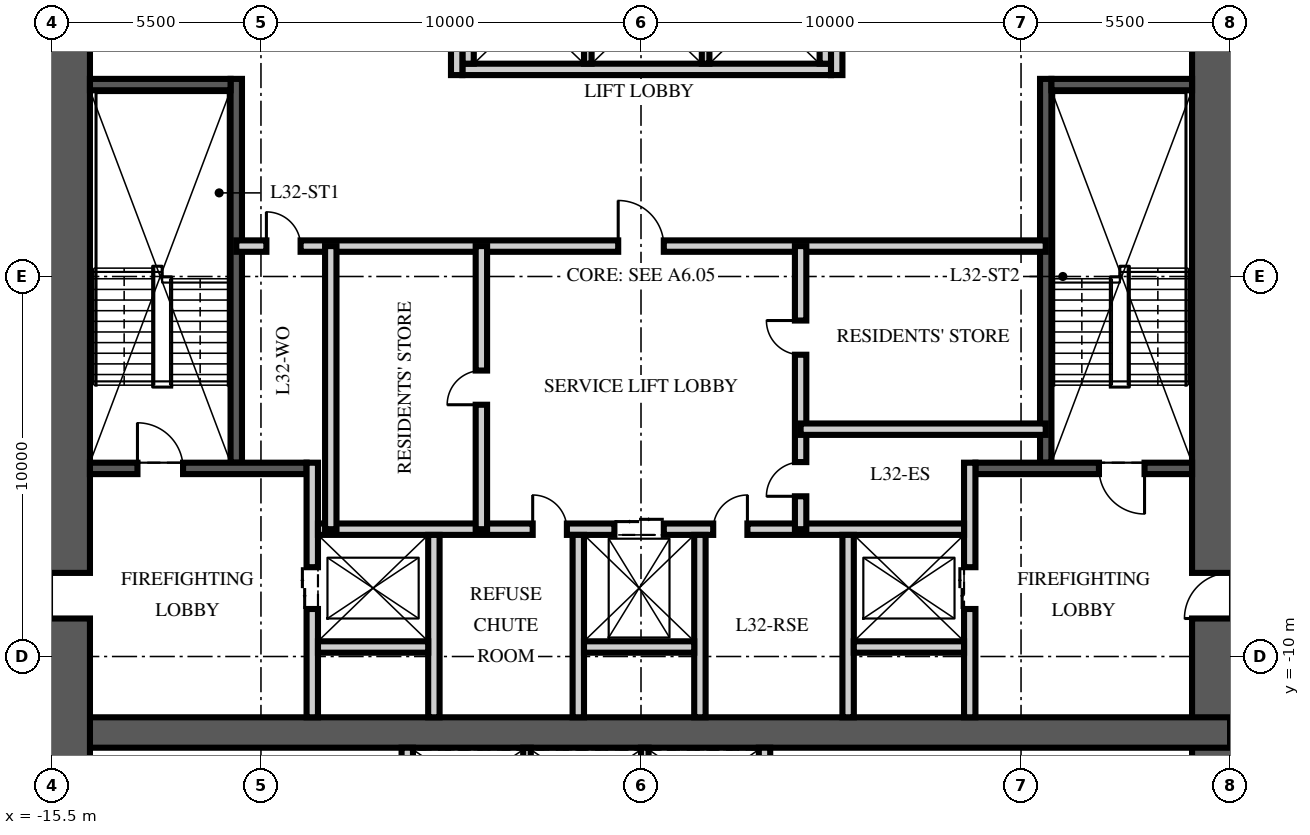
"""IFC4 building model, lengths in metres.
Left out: names, types, materials, properties, quantities, classifications, styles, units other than length and angle.
Written with IfcOpenShell. Run it as: python <this file> out.ifc"""

import sys

from ifc_helpers import new_model, si_unit, direction, frame, frame_2d, origin, place, context, subcontext, project, spatial, rectangle, extrude, element, fill, save


model = new_model("IFC4")
c1 = context("Model", 3, precision=1e-05, world=origin(), true_north=direction((0.0, 1.0)))
c2 = subcontext(c1, "Body", "Model", "MODEL_VIEW")
j1 = project(units=[si_unit("LENGTHUNIT", "METRE"), si_unit("PLANEANGLEUNIT", "RADIAN")], contexts=[c1])
p1 = place(None, origin())
s1 = spatial("IfcSite", under=j1, at=p1, CompositionType="ELEMENT")
p2 = place(p1, origin())
s2 = spatial("IfcBuilding", under=s1, at=p2, CompositionType="ELEMENT")
p3 = place(p2, frame((0.0, 0.0, 129.75)))
s3 = spatial("IfcBuildingStorey", under=s2, at=p3, CompositionType="ELEMENT", Elevation=129.75)
p4 = place(p3, frame((15.5, -15.5, -0.25), z_axis=(0.0, 0.0, 1.0), x_axis=(0.0, 1.0, 0.0)))
e1 = element("IfcWall", 1, at=p4, inside=s3, PredefinedType="SHEAR", context=c2, shape_type="SweptSolid", body=[
    extrude(rectangle(XDim=31.0, YDim=2.0, at=frame_2d((15.5, 0.0))), origin(), (0.0, 0.0, 1.0), 3.75),
])
p5 = place(p4, frame((6.5, 0.0, 0.25)))
e2 = element("IfcOpeningElement", 2, at=p5, cuts=e1, PredefinedType="OPENING", context=c2, shape_type="SweptSolid", body=[
    extrude(rectangle(XDim=1.2, YDim=2.1, at=frame_2d((0.6, 1.05))), frame((0.0, 1.01, 0.0), z_axis=(0.0, -1.0, 0.0), x_axis=(1.0, 0.0, 0.0)), (0.0, 0.0, 1.0), 2.02),
])
p6 = place(p4, frame((23.0, 0.0, 0.25)))
e3 = element("IfcOpeningElement", 3, at=p6, cuts=e1, PredefinedType="OPENING", context=c2, shape_type="SweptSolid", body=[
    extrude(rectangle(XDim=1.8, YDim=2.1, at=frame_2d((0.9, 1.05))), frame((0.0, 1.01, 0.0), z_axis=(0.0, -1.0, 0.0), x_axis=(1.0, 0.0, 0.0)), (0.0, 0.0, 1.0), 2.02),
])
p7 = place(p3, frame((-15.5, -12.0, -0.25), z_axis=(0.0, 0.0, 1.0), x_axis=(1.0, 0.0, 0.0)))
e4 = element("IfcWall", 4, at=p7, inside=s3, PredefinedType="SHEAR", context=c2, shape_type="SweptSolid", body=[
    extrude(rectangle(XDim=31.0, YDim=0.8, at=frame_2d((15.5, 0.0))), origin(), (0.0, 0.0, 1.0), 3.75),
])
p8 = place(p3, frame((-15.5, -15.5, -0.25), z_axis=(0.0, 0.0, 1.0), x_axis=(0.0, 1.0, 0.0)))
e5 = element("IfcWall", 5, at=p8, inside=s3, PredefinedType="SHEAR", context=c2, shape_type="SweptSolid", body=[
    extrude(rectangle(XDim=31.0, YDim=2.0, at=frame_2d((15.5, 0.0))), origin(), (0.0, 0.0, 1.0), 3.75),
])
p9 = place(p8, frame((6.5, 0.0, 0.25)))
e6 = element("IfcOpeningElement", 6, at=p9, cuts=e5, PredefinedType="OPENING", context=c2, shape_type="SweptSolid", body=[
    extrude(rectangle(XDim=1.2, YDim=2.1, at=frame_2d((0.6, 1.05))), frame((0.0, 1.01, 0.0), z_axis=(0.0, -1.0, 0.0), x_axis=(1.0, 0.0, 0.0)), (0.0, 0.0, 1.0), 2.02),
])
p10 = place(p8, frame((23.0, 0.0, 0.25)))
e7 = element("IfcOpeningElement", 7, at=p10, cuts=e5, PredefinedType="OPENING", context=c2, shape_type="SweptSolid", body=[
    extrude(rectangle(XDim=1.8, YDim=2.1, at=frame_2d((0.9, 1.05))), frame((0.0, 1.01, 0.0), z_axis=(0.0, -1.0, 0.0), x_axis=(1.0, 0.0, 0.0)), (0.0, 0.0, 1.0), 2.02),
])
p11 = place(p3, frame((-10.65, -4.9, 0.0), z_axis=(0.0, 0.0, 1.0), x_axis=(0.0, 1.0, 0.0)))
e8 = element("IfcWall", 8, at=p11, inside=s3, PredefinedType="SOLIDWALL", context=c2, shape_type="SweptSolid", body=[
    extrude(rectangle(XDim=10.1, YDim=0.3, at=frame_2d((5.05, 0.0))), origin(), (0.0, 0.0, 1.0), 3.5),
])
p12 = place(p3, frame((-14.5, -5.05, 0.0), z_axis=(0.0, 0.0, 1.0), x_axis=(1.0, 0.0, 0.0)))
e9 = element("IfcWall", 9, at=p12, inside=s3, PredefinedType="SOLIDWALL", context=c2, shape_type="SweptSolid", body=[
    extrude(rectangle(XDim=5.7, YDim=0.3, at=frame_2d((2.85, 0.0))), origin(), (0.0, 0.0, 1.0), 3.5),
])
p13 = place(p12, frame((1.25, 0.0, 0.0)))
e10 = element("IfcOpeningElement", 10, at=p13, cuts=e9, PredefinedType="OPENING", context=c2, shape_type="SweptSolid", body=[
    extrude(rectangle(XDim=1.2, YDim=2.1, at=frame_2d((0.6, 1.05))), frame((0.0, 0.16, 0.0), z_axis=(0.0, -1.0, 0.0), x_axis=(1.0, 0.0, 0.0)), (0.0, 0.0, 1.0), 0.32),
])
p14 = place(p3, frame((-14.5, 5.05, 0.0), z_axis=(0.0, 0.0, 1.0), x_axis=(1.0, 0.0, 0.0)))
e11 = element("IfcWall", 11, at=p14, inside=s3, PredefinedType="SOLIDWALL", context=c2, shape_type="SweptSolid", body=[
    extrude(rectangle(XDim=3.7, YDim=0.3, at=frame_2d((1.85, 0.0))), origin(), (0.0, 0.0, 1.0), 3.5),
])
p15 = place(p3, frame((-8.65, -11.6, 0.0), z_axis=(0.0, 0.0, 1.0), x_axis=(0.0, 1.0, 0.0)))
e12 = element("IfcWall", 12, at=p15, inside=s3, PredefinedType="PARTITIONING", context=c2, shape_type="SweptSolid", body=[
    extrude(rectangle(XDim=6.7, YDim=0.3, at=frame_2d((3.35, 0.0))), origin(), (0.0, 0.0, 1.0), 3.5),
])
p16 = place(p15, frame((2.85, 0.0, 0.0)))
e13 = element("IfcOpeningElement", 13, at=p16, cuts=e12, PredefinedType="OPENING", context=c2, shape_type="SweptSolid", body=[
    extrude(rectangle(XDim=1.1, YDim=2.1, at=frame_2d((0.55, 1.05))), frame((0.0, 0.16, 0.0), z_axis=(0.0, -1.0, 0.0), x_axis=(1.0, 0.0, 0.0)), (0.0, 0.0, 1.0), 0.32),
])
p17 = place(p3, frame((10.65, -4.9, 0.0), z_axis=(0.0, 0.0, 1.0), x_axis=(0.0, 1.0, 0.0)))
e14 = element("IfcWall", 14, at=p17, inside=s3, PredefinedType="SOLIDWALL", context=c2, shape_type="SweptSolid", body=[
    extrude(rectangle(XDim=10.1, YDim=0.3, at=frame_2d((5.05, 0.0))), origin(), (0.0, 0.0, 1.0), 3.5),
])
p18 = place(p3, frame((14.5, -5.05, 0.0), z_axis=(0.0, 0.0, 1.0), x_axis=(-1.0, 0.0, 0.0)))
e15 = element("IfcWall", 15, at=p18, inside=s3, PredefinedType="SOLIDWALL", context=c2, shape_type="SweptSolid", body=[
    extrude(rectangle(XDim=5.7, YDim=0.3, at=frame_2d((2.85, 0.0))), origin(), (0.0, 0.0, 1.0), 3.5),
])
p19 = place(p18, frame((1.25, 0.0, 0.0)))
e16 = element("IfcOpeningElement", 16, at=p19, cuts=e15, PredefinedType="OPENING", context=c2, shape_type="SweptSolid", body=[
    extrude(rectangle(XDim=1.2, YDim=2.1, at=frame_2d((0.6, 1.05))), frame((0.0, 0.16, 0.0), z_axis=(0.0, -1.0, 0.0), x_axis=(1.0, 0.0, 0.0)), (0.0, 0.0, 1.0), 0.32),
])
p20 = place(p3, frame((14.5, 5.05, 0.0), z_axis=(0.0, 0.0, 1.0), x_axis=(-1.0, 0.0, 0.0)))
e17 = element("IfcWall", 17, at=p20, inside=s3, PredefinedType="SOLIDWALL", context=c2, shape_type="SweptSolid", body=[
    extrude(rectangle(XDim=3.7, YDim=0.3, at=frame_2d((1.85, 0.0))), origin(), (0.0, 0.0, 1.0), 3.5),
])
p21 = place(p3, frame((8.65, -11.6, 0.0), z_axis=(0.0, 0.0, 1.0), x_axis=(0.0, 1.0, 0.0)))
e18 = element("IfcWall", 18, at=p21, inside=s3, PredefinedType="PARTITIONING", context=c2, shape_type="SweptSolid", body=[
    extrude(rectangle(XDim=6.7, YDim=0.3, at=frame_2d((3.35, 0.0))), origin(), (0.0, 0.0, 1.0), 3.5),
])
p22 = place(p21, frame((2.85, 0.0, 0.0)))
e19 = element("IfcOpeningElement", 19, at=p22, cuts=e18, PredefinedType="OPENING", context=c2, shape_type="SweptSolid", body=[
    extrude(rectangle(XDim=1.1, YDim=2.1, at=frame_2d((0.55, 1.05))), frame((0.0, 0.16, 0.0), z_axis=(0.0, -1.0, 0.0), x_axis=(1.0, 0.0, 0.0)), (0.0, 0.0, 1.0), 0.32),
])
p23 = place(p3, frame((-8.5, -6.65, 0.0), z_axis=(0.0, 0.0, 1.0), x_axis=(1.0, 0.0, 0.0)))
e20 = element("IfcWall", 20, at=p23, inside=s3, PredefinedType="PARTITIONING", context=c2, shape_type="SweptSolid", body=[
    extrude(rectangle(XDim=17.0, YDim=0.3, at=frame_2d((8.5, 0.0))), origin(), (0.0, 0.0, 1.0), 3.5),
])
p24 = place(p23, frame((7.8, 0.0, 0.0)))
e21 = element("IfcOpeningElement", 21, at=p24, cuts=e20, PredefinedType="OPENING", context=c2, shape_type="SweptSolid", body=[
    extrude(rectangle(XDim=1.3, YDim=2.4, at=frame_2d((0.65, 1.2))), frame((0.0, 0.16, 0.0), z_axis=(0.0, -1.0, 0.0), x_axis=(1.0, 0.0, 0.0)), (0.0, 0.0, 1.0), 0.32),
])
p25 = place(p23, frame((5.65, 0.0, 0.0)))
e22 = element("IfcOpeningElement", 22, at=p25, cuts=e20, PredefinedType="OPENING", context=c2, shape_type="SweptSolid", body=[
    extrude(rectangle(XDim=0.9, YDim=2.1, at=frame_2d((0.45, 1.05))), frame((0.0, 0.16, 0.0), z_axis=(0.0, -1.0, 0.0), x_axis=(1.0, 0.0, 0.0)), (0.0, 0.0, 1.0), 0.32),
])
p26 = place(p23, frame((10.4, 0.0, 0.0)))
e23 = element("IfcOpeningElement", 23, at=p26, cuts=e20, PredefinedType="OPENING", context=c2, shape_type="SweptSolid", body=[
    extrude(rectangle(XDim=0.9, YDim=2.1, at=frame_2d((0.45, 1.05))), frame((0.0, 0.16, 0.0), z_axis=(0.0, -1.0, 0.0), x_axis=(1.0, 0.0, 0.0)), (0.0, 0.0, 1.0), 0.32),
])
for number, where, z_axis, x_axis in (
    (24, (-5.45, -11.6, 0.0), (0.0, 0.0, 1.0), (0.0, 1.0, 0.0)),
    (25, (-1.65, -11.6, 0.0), (0.0, 0.0, 1.0), (0.0, 1.0, 0.0)),
    (26, (1.55, -11.6, 0.0), (0.0, 0.0, 1.0), (0.0, 1.0, 0.0)),
    (27, (5.45, -11.6, 0.0), (0.0, 0.0, 1.0), (0.0, 1.0, 0.0)),
):
    element("IfcWall", number, at=place(p3, frame(where, z_axis=z_axis, x_axis=x_axis)), inside=s3, PredefinedType="PARTITIONING", context=c2, shape_type="SweptSolid", body=[
        extrude(rectangle(XDim=4.8, YDim=0.3, at=frame_2d((2.4, 0.0))), origin(), (0.0, 0.0, 1.0), 3.5),
    ])
for number, where, z_axis, x_axis in (
    (28, (-8.5, -9.75, 0.0), (0.0, 0.0, 1.0), (1.0, 0.0, 0.0)),
    (29, (-1.5, -9.75, 0.0), (0.0, 0.0, 1.0), (1.0, 0.0, 0.0)),
    (30, (5.6, -9.75, 0.0), (0.0, 0.0, 1.0), (1.0, 0.0, 0.0)),
):
    element("IfcWall", number, at=place(p3, frame(where, z_axis=z_axis, x_axis=x_axis)), inside=s3, PredefinedType="PARTITIONING", context=c2, shape_type="SweptSolid", body=[
        extrude(rectangle(XDim=2.9, YDim=0.3, at=frame_2d((1.45, 0.0))), origin(), (0.0, 0.0, 1.0), 3.5),
    ])
p27 = place(p3, frame((-4.7, 5.45, 0.0), z_axis=(0.0, 0.0, 1.0), x_axis=(1.0, 0.0, 0.0)))
e31 = element("IfcWall", 31, at=p27, inside=s3, PredefinedType="PARTITIONING", context=c2, shape_type="SweptSolid", body=[
    extrude(rectangle(XDim=9.7, YDim=0.3, at=frame_2d((4.85, 0.0))), origin(), (0.0, 0.0, 1.0), 3.5),
])
for number, where, z_axis, x_axis in (
    (32, (-4.55, 5.6, 0.0), (0.0, 0.0, 1.0), (0.0, 1.0, 0.0)),
    (33, (4.85, 5.6, 0.0), (0.0, 0.0, 1.0), (0.0, 1.0, 0.0)),
):
    element("IfcWall", number, at=place(p3, frame(where, z_axis=z_axis, x_axis=x_axis)), inside=s3, PredefinedType="PARTITIONING", context=c2, shape_type="SweptSolid", body=[
        extrude(rectangle(XDim=2.8, YDim=0.3, at=frame_2d((1.4, 0.0))), origin(), (0.0, 0.0, 1.0), 3.5),
    ])
for number, where, z_axis, x_axis in (
    (34, (-1.4, 5.6, 0.0), (0.0, 0.0, 1.0), (0.0, 1.0, 0.0)),
    (35, (1.7, 5.6, 0.0), (0.0, 0.0, 1.0), (0.0, 1.0, 0.0)),
):
    element("IfcWall", number, at=place(p3, frame(where, z_axis=z_axis, x_axis=x_axis)), inside=s3, PredefinedType="PARTITIONING", context=c2, shape_type="SweptSolid", body=[
        extrude(rectangle(XDim=2.8, YDim=0.2, at=frame_2d((1.4, 0.0))), origin(), (0.0, 0.0, 1.0), 3.5),
    ])
for number, where, z_axis, x_axis in (
    (36, (-6.15, -14.5, 0.0), (0.0, 0.0, 1.0), (0.0, 1.0, 0.0)),
    (37, (3.25, -14.5, 0.0), (0.0, 0.0, 1.0), (0.0, 1.0, 0.0)),
):
    element("IfcWall", number, at=place(p3, frame(where, z_axis=z_axis, x_axis=x_axis)), inside=s3, PredefinedType="PARTITIONING", context=c2, shape_type="SweptSolid", body=[
        extrude(rectangle(XDim=2.1, YDim=0.3, at=frame_2d((1.05, 0.0))), origin(), (0.0, 0.0, 1.0), 3.5),
    ])
for number, where, z_axis, x_axis in (
    (38, (-3.0, -14.5, 0.0), (0.0, 0.0, 1.0), (0.0, 1.0, 0.0)),
    (39, (0.1, -14.5, 0.0), (0.0, 0.0, 1.0), (0.0, 1.0, 0.0)),
):
    element("IfcWall", number, at=place(p3, frame(where, z_axis=z_axis, x_axis=x_axis)), inside=s3, PredefinedType="PARTITIONING", context=c2, shape_type="SweptSolid", body=[
        extrude(rectangle(XDim=2.1, YDim=0.2, at=frame_2d((1.05, 0.0))), origin(), (0.0, 0.0, 1.0), 3.5),
    ])
p28 = place(p3, frame((-10.65, 0.8, 0.0), z_axis=(0.0, 0.0, 1.0), x_axis=(1.0, 0.0, 0.0)))
e40 = element("IfcWall", 40, at=p28, inside=s3, PredefinedType="PARTITIONING", context=c2, shape_type="SweptSolid", body=[
    extrude(rectangle(XDim=21.3, YDim=0.3, at=frame_2d((10.65, 0.0))), origin(), (0.0, 0.0, 1.0), 3.5),
])
p29 = place(p28, frame((10.05, 0.0, 0.0)))
e41 = element("IfcOpeningElement", 41, at=p29, cuts=e40, PredefinedType="OPENING", context=c2, shape_type="SweptSolid", body=[
    extrude(rectangle(XDim=1.2, YDim=2.1, at=frame_2d((0.6, 1.05))), frame((0.0, 0.16, 0.0), z_axis=(0.0, -1.0, 0.0), x_axis=(1.0, 0.0, 0.0)), (0.0, 0.0, 1.0), 0.32),
])
p30 = place(p28, frame((0.793, 0.0, 0.0)))
e42 = element("IfcOpeningElement", 42, at=p30, cuts=e40, PredefinedType="OPENING", context=c2, shape_type="SweptSolid", body=[
    extrude(rectangle(XDim=0.9, YDim=2.1, at=frame_2d((0.45, 1.05))), frame((0.0, 0.16, 0.0), z_axis=(0.0, -1.0, 0.0), x_axis=(1.0, 0.0, 0.0)), (0.0, 0.0, 1.0), 0.32),
])
p31 = place(p3, frame((-4.2, -6.65, 0.0), z_axis=(0.0, 0.0, 1.0), x_axis=(0.0, 1.0, 0.0)))
e43 = element("IfcWall", 43, at=p31, inside=s3, PredefinedType="PARTITIONING", context=c2, shape_type="SweptSolid", body=[
    extrude(rectangle(XDim=7.45, YDim=0.3, at=frame_2d((3.725, 0.0))), origin(), (0.0, 0.0, 1.0), 3.5),
])
p32 = place(p31, frame((3.275, 0.0, 0.0)))
e44 = element("IfcOpeningElement", 44, at=p32, cuts=e43, PredefinedType="OPENING", context=c2, shape_type="SweptSolid", body=[
    extrude(rectangle(XDim=0.9, YDim=2.1, at=frame_2d((0.45, 1.05))), frame((0.0, 0.16, 0.0), z_axis=(0.0, -1.0, 0.0), x_axis=(1.0, 0.0, 0.0)), (0.0, 0.0, 1.0), 0.32),
])
p33 = place(p3, frame((4.2, -6.65, 0.0), z_axis=(0.0, 0.0, 1.0), x_axis=(0.0, 1.0, 0.0)))
e45 = element("IfcWall", 45, at=p33, inside=s3, PredefinedType="PARTITIONING", context=c2, shape_type="SweptSolid", body=[
    extrude(rectangle(XDim=7.45, YDim=0.3, at=frame_2d((3.725, 0.0))), origin(), (0.0, 0.0, 1.0), 3.5),
])
p34 = place(p33, frame((0.866, 0.0, 0.0)))
e46 = element("IfcOpeningElement", 46, at=p34, cuts=e45, PredefinedType="OPENING", context=c2, shape_type="SweptSolid", body=[
    extrude(rectangle(XDim=0.9, YDim=2.1, at=frame_2d((0.45, 1.05))), frame((0.0, 0.16, 0.0), z_axis=(0.0, -1.0, 0.0), x_axis=(1.0, 0.0, 0.0)), (0.0, 0.0, 1.0), 0.32),
])
p35 = place(p33, frame((4.591, 0.0, 0.0)))
e47 = element("IfcOpeningElement", 47, at=p35, cuts=e45, PredefinedType="OPENING", context=c2, shape_type="SweptSolid", body=[
    extrude(rectangle(XDim=0.9, YDim=2.1, at=frame_2d((0.45, 1.05))), frame((0.0, 0.16, 0.0), z_axis=(0.0, -1.0, 0.0), x_axis=(1.0, 0.0, 0.0)), (0.0, 0.0, 1.0), 0.32),
])
p36 = place(p3, frame((-8.163, -6.65, 0.0), z_axis=(0.0, 0.0, 1.0), x_axis=(0.0, 1.0, 0.0)))
e48 = element("IfcWall", 48, at=p36, inside=s3, PredefinedType="PARTITIONING", context=c2, shape_type="SweptSolid", body=[
    extrude(rectangle(XDim=7.45, YDim=0.3, at=frame_2d((3.725, 0.0))), origin(), (0.0, 0.0, 1.0), 3.5),
])
p37 = place(p3, frame((10.65, -4.018, 0.0), z_axis=(0.0, 0.0, 1.0), x_axis=(-1.0, 0.0, 0.0)))
e49 = element("IfcWall", 49, at=p37, inside=s3, PredefinedType="PARTITIONING", context=c2, shape_type="SweptSolid", body=[
    extrude(rectangle(XDim=6.45, YDim=0.3, at=frame_2d((3.225, 0.0))), origin(), (0.0, 0.0, 1.0), 3.5),
])
p38 = place(p3, frame((-4.85, 5.3, 0.0), z_axis=(0.0, 0.0, 1.0), x_axis=(0.0, 1.0, 0.0)))
e50 = element("IfcWall", 50, at=p38, inside=s3, PredefinedType="PARTITIONING", context=c2, shape_type="SweptSolid", body=[
    extrude(rectangle(XDim=6.3, YDim=0.3, at=frame_2d((3.15, 0.0))), origin(), (0.0, 0.0, 1.0), 3.5),
])
p39 = place(p38, frame((4.35, 0.0, 0.0)))
e51 = element("IfcOpeningElement", 51, at=p39, cuts=e50, PredefinedType="OPENING", context=c2, shape_type="SweptSolid", body=[
    extrude(rectangle(XDim=0.9, YDim=2.1, at=frame_2d((0.45, 1.05))), frame((0.0, 0.16, 0.0), z_axis=(0.0, -1.0, 0.0), x_axis=(1.0, 0.0, 0.0)), (0.0, 0.0, 1.0), 0.32),
])
p40 = place(p3, frame((5.15, 5.3, 0.0), z_axis=(0.0, 0.0, 1.0), x_axis=(0.0, 1.0, 0.0)))
e52 = element("IfcWall", 52, at=p40, inside=s3, PredefinedType="PARTITIONING", context=c2, shape_type="SweptSolid", body=[
    extrude(rectangle(XDim=6.3, YDim=0.3, at=frame_2d((3.15, 0.0))), origin(), (0.0, 0.0, 1.0), 3.5),
])
p41 = place(p40, frame((4.35, 0.0, 0.0)))
e53 = element("IfcOpeningElement", 53, at=p41, cuts=e52, PredefinedType="OPENING", context=c2, shape_type="SweptSolid", body=[
    extrude(rectangle(XDim=0.9, YDim=2.1, at=frame_2d((0.45, 1.05))), frame((0.0, 0.16, 0.0), z_axis=(0.0, -1.0, 0.0), x_axis=(1.0, 0.0, 0.0)), (0.0, 0.0, 1.0), 0.32),
])
p42 = place(p13, origin())
e54 = element("IfcDoor", 54, at=p42, inside=s3, OperationType="SINGLE_SWING_LEFT", PredefinedType="DOOR", context=c2, shape_type="SweptSolid", body=[
    extrude(rectangle(XDim=1.2, YDim=2.1, at=frame_2d((0.6, 1.05))), frame((0.0, 0.025, 0.0), z_axis=(0.0, -1.0, 0.0), x_axis=(1.0, 0.0, 0.0)), (0.0, 0.0, 1.0), 0.05),
])
fill(e10, e54)
p43 = place(p9, origin())
e55 = element("IfcDoor", 55, at=p43, inside=s3, OperationType="SINGLE_SWING_LEFT", PredefinedType="DOOR", context=c2, shape_type="SweptSolid", body=[
    extrude(rectangle(XDim=1.2, YDim=2.1, at=frame_2d((0.6, 1.05))), frame((0.0, 0.025, 0.0), z_axis=(0.0, -1.0, 0.0), x_axis=(1.0, 0.0, 0.0)), (0.0, 0.0, 1.0), 0.05),
])
fill(e6, e55)
p44 = place(p19, origin())
e56 = element("IfcDoor", 56, at=p44, inside=s3, OperationType="SINGLE_SWING_LEFT", PredefinedType="DOOR", context=c2, shape_type="SweptSolid", body=[
    extrude(rectangle(XDim=1.2, YDim=2.1, at=frame_2d((0.6, 1.05))), frame((0.0, 0.025, 0.0), z_axis=(0.0, -1.0, 0.0), x_axis=(1.0, 0.0, 0.0)), (0.0, 0.0, 1.0), 0.05),
])
fill(e16, e56)
p45 = place(p5, origin())
e57 = element("IfcDoor", 57, at=p45, inside=s3, OperationType="SINGLE_SWING_LEFT", PredefinedType="DOOR", context=c2, shape_type="SweptSolid", body=[
    extrude(rectangle(XDim=1.2, YDim=2.1, at=frame_2d((0.6, 1.05))), frame((0.0, 0.025, 0.0), z_axis=(0.0, -1.0, 0.0), x_axis=(1.0, 0.0, 0.0)), (0.0, 0.0, 1.0), 0.05),
])
fill(e2, e57)
p46 = place(p16, origin())
e58 = element("IfcDoor", 58, at=p46, inside=s3, OperationType="DOUBLE_DOOR_SLIDING", PredefinedType="DOOR", context=c2, shape_type="SweptSolid", body=[
    extrude(rectangle(XDim=1.1, YDim=2.1, at=frame_2d((0.55, 1.05))), frame((0.0, 0.025, 0.0), z_axis=(0.0, -1.0, 0.0), x_axis=(1.0, 0.0, 0.0)), (0.0, 0.0, 1.0), 0.05),
])
fill(e13, e58)
p47 = place(p22, origin())
e59 = element("IfcDoor", 59, at=p47, inside=s3, OperationType="DOUBLE_DOOR_SLIDING", PredefinedType="DOOR", context=c2, shape_type="SweptSolid", body=[
    extrude(rectangle(XDim=1.1, YDim=2.1, at=frame_2d((0.55, 1.05))), frame((0.0, 0.025, 0.0), z_axis=(0.0, -1.0, 0.0), x_axis=(1.0, 0.0, 0.0)), (0.0, 0.0, 1.0), 0.05),
])
fill(e19, e59)
p48 = place(p24, origin())
e60 = element("IfcDoor", 60, at=p48, inside=s3, OperationType="DOUBLE_DOOR_SLIDING", PredefinedType="DOOR", context=c2, shape_type="SweptSolid", body=[
    extrude(rectangle(XDim=1.3, YDim=2.4, at=frame_2d((0.65, 1.2))), frame((0.0, 0.025, 0.0), z_axis=(0.0, -1.0, 0.0), x_axis=(1.0, 0.0, 0.0)), (0.0, 0.0, 1.0), 0.05),
])
fill(e21, e60)
p49 = place(p29, origin())
e61 = element("IfcDoor", 61, at=p49, inside=s3, OperationType="SINGLE_SWING_LEFT", PredefinedType="DOOR", context=c2, shape_type="SweptSolid", body=[
    extrude(rectangle(XDim=1.2, YDim=2.1, at=frame_2d((0.6, 1.05))), frame((0.0, 0.025, 0.0), z_axis=(0.0, -1.0, 0.0), x_axis=(1.0, 0.0, 0.0)), (0.0, 0.0, 1.0), 0.05),
])
fill(e41, e61)
p50 = place(p25, origin())
e62 = element("IfcDoor", 62, at=p50, inside=s3, OperationType="SINGLE_SWING_LEFT", PredefinedType="DOOR", context=c2, shape_type="SweptSolid", body=[
    extrude(rectangle(XDim=0.9, YDim=2.1, at=frame_2d((0.45, 1.05))), frame((0.0, 0.025, 0.0), z_axis=(0.0, -1.0, 0.0), x_axis=(1.0, 0.0, 0.0)), (0.0, 0.0, 1.0), 0.05),
])
fill(e22, e62)
p51 = place(p26, origin())
e63 = element("IfcDoor", 63, at=p51, inside=s3, OperationType="SINGLE_SWING_RIGHT", PredefinedType="DOOR", context=c2, shape_type="SweptSolid", body=[
    extrude(rectangle(XDim=0.9, YDim=2.1, at=frame_2d((0.45, 1.05))), frame((0.0, 0.025, 0.0), z_axis=(0.0, -1.0, 0.0), x_axis=(1.0, 0.0, 0.0)), (0.0, 0.0, 1.0), 0.05),
])
fill(e23, e63)
p52 = place(p32, origin())
e64 = element("IfcDoor", 64, at=p52, inside=s3, OperationType="SINGLE_SWING_LEFT", PredefinedType="DOOR", context=c2, shape_type="SweptSolid", body=[
    extrude(rectangle(XDim=0.9, YDim=2.1, at=frame_2d((0.45, 1.05))), frame((0.0, 0.025, 0.0), z_axis=(0.0, -1.0, 0.0), x_axis=(1.0, 0.0, 0.0)), (0.0, 0.0, 1.0), 0.05),
])
fill(e44, e64)
p53 = place(p30, origin())
e65 = element("IfcDoor", 65, at=p53, inside=s3, OperationType="SINGLE_SWING_LEFT", PredefinedType="DOOR", context=c2, shape_type="SweptSolid", body=[
    extrude(rectangle(XDim=0.9, YDim=2.1, at=frame_2d((0.45, 1.05))), frame((0.0, 0.025, 0.0), z_axis=(0.0, -1.0, 0.0), x_axis=(1.0, 0.0, 0.0)), (0.0, 0.0, 1.0), 0.05),
])
fill(e42, e65)
p54 = place(p34, origin())
e66 = element("IfcDoor", 66, at=p54, inside=s3, OperationType="SINGLE_SWING_LEFT", PredefinedType="DOOR", context=c2, shape_type="SweptSolid", body=[
    extrude(rectangle(XDim=0.9, YDim=2.1, at=frame_2d((0.45, 1.05))), frame((0.0, 0.025, 0.0), z_axis=(0.0, -1.0, 0.0), x_axis=(1.0, 0.0, 0.0)), (0.0, 0.0, 1.0), 0.05),
])
fill(e46, e66)
p55 = place(p35, origin())
e67 = element("IfcDoor", 67, at=p55, inside=s3, OperationType="SINGLE_SWING_RIGHT", PredefinedType="DOOR", context=c2, shape_type="SweptSolid", body=[
    extrude(rectangle(XDim=0.9, YDim=2.1, at=frame_2d((0.45, 1.05))), frame((0.0, 0.025, 0.0), z_axis=(0.0, -1.0, 0.0), x_axis=(1.0, 0.0, 0.0)), (0.0, 0.0, 1.0), 0.05),
])
fill(e47, e67)
save(model, sys.argv[1])
